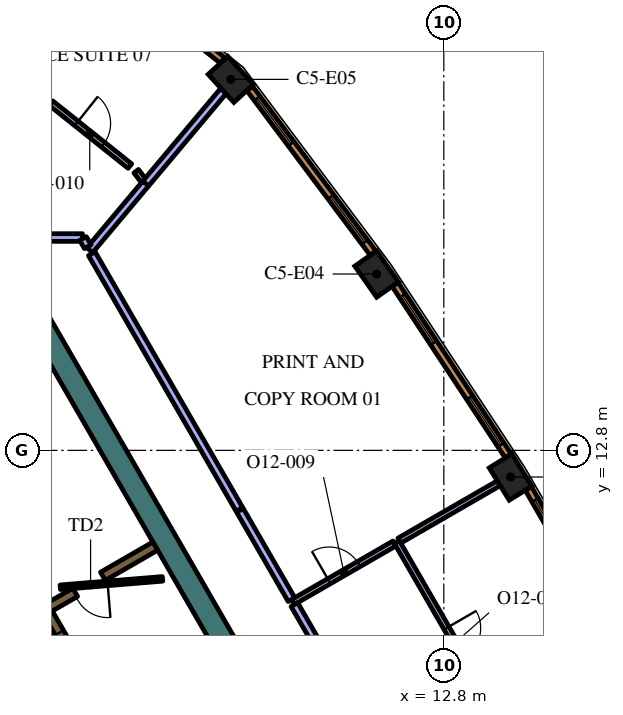
"""IFC4 building model, lengths in metres.
Left out: names, types, materials, properties, quantities, classifications, styles, units other than length and angle.
Written with IfcOpenShell. Run it as: python <this file> out.ifc"""

import sys

from ifc_helpers import new_model, si_unit, direction, frame, frame_2d, origin, origin_2d, place, context, subcontext, project, spatial, rectangle, extrude, element, fill, save


model = new_model("IFC4")
c1 = context("Model", 3, precision=1e-05, world=origin(), true_north=direction((0.0, 1.0)))
c2 = subcontext(c1, "Body", "Model", "MODEL_VIEW")
j1 = project(units=[si_unit("LENGTHUNIT", "METRE"), si_unit("PLANEANGLEUNIT", "RADIAN")], contexts=[c1])
p1 = place(None, origin())
s1 = spatial("IfcSite", under=j1, at=p1, CompositionType="ELEMENT")
p2 = place(p1, origin())
s2 = spatial("IfcBuilding", under=s1, at=p2, CompositionType="ELEMENT")
p3 = place(p2, frame((0.0, 0.0, 288.0)))
s3 = spatial("IfcBuildingStorey", under=s2, at=p3, CompositionType="ELEMENT", Elevation=288.0)
for number, where, z_axis, x_axis in (
    (1, (14.556, 12.098, 0.0), (0.0, 0.0, 1.0), (-0.526, 0.851, 0.0)),
    (2, (11.032, 17.44, 0.0), (0.0, 0.0, 1.0), (-0.575, 0.818, 0.0)),
    (3, (7.195, 22.561, 0.0), (0.0, 0.0, 1.0), (-0.676, 0.737, 0.0)),
):
    element("IfcColumn", number, at=place(p3, frame(where, z_axis=z_axis, x_axis=x_axis)), inside=s3, PredefinedType="COLUMN", context=c2, shape_type="SweptSolid", body=[
        extrude(rectangle(XDim=1.0, YDim=0.7, at=origin_2d()), origin(), (0.0, 0.0, 1.0), 4.2),
    ])
p4 = place(p3, frame((1.989, 16.456, 0.0), z_axis=(0.0, 0.0, 1.0), x_axis=(0.49999102663, -0.8660305845, 0.0)))
e4 = element("IfcWall", 4, at=p4, inside=s3, PredefinedType="SOLIDWALL", context=c2, shape_type="SweptSolid", body=[
    extrude(rectangle(XDim=12.406, YDim=0.6, at=frame_2d((6.203, 0.0))), origin(), (0.0, 0.0, 1.0), 4.2),
])
p5 = place(p3, frame((3.1, 9.064, 0.0), z_axis=(0.0, 0.0, 1.0), x_axis=(-0.866030133475, -0.499991807846, 0.0)))
e5 = element("IfcWall", 5, at=p5, inside=s3, PredefinedType="SOLIDWALL", context=c2, shape_type="SweptSolid", body=[
    extrude(rectangle(XDim=3.217, YDim=0.25, at=frame_2d((1.608, 0.0))), origin(), (0.0, 0.0, 1.0), 4.2),
])
p6 = place(p3, frame((3.83, 9.486, 0.0), z_axis=(0.0, 0.0, 1.0), x_axis=(0.865986202621, 0.500067892261, 0.0)))
e6 = element("IfcWall", 6, at=p6, inside=s3, PredefinedType="SOLIDWALL", context=c2, shape_type="SweptSolid", body=[
    extrude(rectangle(XDim=1.591, YDim=0.25, at=frame_2d((0.795, 0.0))), origin(), (0.0, 0.0, 1.0), 4.2),
])
p7 = place(p3, frame((8.565, -2.185, 0.0), z_axis=(0.0, 0.0, 1.0), x_axis=(-0.499997954832, 0.866026584559, 0.0)))
e7 = element("IfcWall", 7, at=p7, inside=s3, PredefinedType="SOLIDWALL", context=c2, shape_type="SweptSolid", body=[
    extrude(rectangle(XDim=12.35, YDim=0.25, at=frame_2d((6.175, 0.0))), origin(), (0.0, 0.0, 1.0), 4.2),
])
p8 = place(p7, frame((0.685, 0.0, 0.0)))
e8 = element("IfcOpeningElement", 8, at=p8, cuts=e7, PredefinedType="OPENING", context=c2, shape_type="SweptSolid", body=[
    extrude(rectangle(XDim=0.9, YDim=2.1, at=frame_2d((0.45, 1.05))), frame((0.0, 0.135, 0.0), z_axis=(0.0, -1.0, 0.0), x_axis=(1.0, 0.0, 0.0)), (0.0, 0.0, 1.0), 0.27),
])
p9 = place(p7, frame((3.105, 0.0, 0.0)))
e9 = element("IfcOpeningElement", 9, at=p9, cuts=e7, PredefinedType="OPENING", context=c2, shape_type="SweptSolid", body=[
    extrude(rectangle(XDim=1.1, YDim=2.1, at=frame_2d((0.55, 1.05))), frame((0.0, 0.135, 0.0), z_axis=(0.0, -1.0, 0.0), x_axis=(1.0, 0.0, 0.0)), (0.0, 0.0, 1.0), 0.27),
])
p10 = place(p7, frame((5.625, 0.0, 0.0)))
e10 = element("IfcOpeningElement", 10, at=p10, cuts=e7, PredefinedType="OPENING", context=c2, shape_type="SweptSolid", body=[
    extrude(rectangle(XDim=1.1, YDim=2.1, at=frame_2d((0.55, 1.05))), frame((0.0, 0.135, 0.0), z_axis=(0.0, -1.0, 0.0), x_axis=(1.0, 0.0, 0.0)), (0.0, 0.0, 1.0), 0.27),
])
p11 = place(p7, frame((8.145, 0.0, 0.0)))
e11 = element("IfcOpeningElement", 11, at=p11, cuts=e7, PredefinedType="OPENING", context=c2, shape_type="SweptSolid", body=[
    extrude(rectangle(XDim=1.1, YDim=2.1, at=frame_2d((0.55, 1.05))), frame((0.0, 0.135, 0.0), z_axis=(0.0, -1.0, 0.0), x_axis=(1.0, 0.0, 0.0)), (0.0, 0.0, 1.0), 0.27),
])
p12 = place(p7, frame((10.665, 0.0, 0.0)))
e12 = element("IfcOpeningElement", 12, at=p12, cuts=e7, PredefinedType="OPENING", context=c2, shape_type="SweptSolid", body=[
    extrude(rectangle(XDim=1.1, YDim=2.1, at=frame_2d((0.55, 1.05))), frame((0.0, 0.135, 0.0), z_axis=(0.0, -1.0, 0.0), x_axis=(1.0, 0.0, 0.0)), (0.0, 0.0, 1.0), 0.27),
])
p13 = place(p3, frame((5.398, 9.419, 0.0), z_axis=(0.0, 0.0, 1.0), x_axis=(-0.996653416376, -0.081743303248, 0.0)))
e13 = element("IfcWall", 13, at=p13, inside=s3, PredefinedType="PARTITIONING", context=c2, shape_type="SweptSolid", body=[
    extrude(rectangle(XDim=2.7, YDim=0.12, at=frame_2d((1.35, 0.0))), origin(), (0.0, 0.0, 1.0), 3.55),
])
p14 = place(p13, frame((1.45, 0.0, 0.0)))
e14 = element("IfcOpeningElement", 14, at=p14, cuts=e13, PredefinedType="OPENING", context=c2, shape_type="SweptSolid", body=[
    extrude(rectangle(XDim=0.9, YDim=2.1, at=frame_2d((0.45, 1.05))), frame((0.0, 0.07, 0.0), z_axis=(0.0, -1.0, 0.0), x_axis=(1.0, 0.0, 0.0)), (0.0, 0.0, 1.0), 0.14),
])
p15 = place(p3, frame((11.564, 10.387, 0.0), z_axis=(0.0, 0.0, 1.0), x_axis=(0.500002559113, -0.866023926275, 0.0)))
e15 = element("IfcWall", 15, at=p15, inside=s3, PredefinedType="PARTITIONING", context=c2, shape_type="SweptSolid", body=[
    extrude(rectangle(XDim=6.212, YDim=0.15, at=frame_2d((3.106, 0.0))), origin(), (0.0, 0.0, 1.0), 3.55),
])
p16 = place(p15, frame((2.612, 0.0, 0.0)))
e16 = element("IfcOpeningElement", 16, at=p16, cuts=e15, PredefinedType="OPENING", context=c2, shape_type="SweptSolid", body=[
    extrude(rectangle(XDim=0.9, YDim=2.1, at=frame_2d((0.45, 1.05))), frame((0.0, 0.085, 0.0), z_axis=(0.0, -1.0, 0.0), x_axis=(1.0, 0.0, 0.0)), (0.0, 0.0, 1.0), 0.17),
])
p17 = place(p3, frame((11.629, 10.424, 0.0), z_axis=(0.0, 0.0, 1.0), x_axis=(0.866061796884, 0.499936960004, 0.0)))
e17 = element("IfcWall", 17, at=p17, inside=s3, PredefinedType="PARTITIONING", context=c2, shape_type="SweptSolid", body=[
    extrude(rectangle(XDim=3.021, YDim=0.15, at=frame_2d((1.511, 0.0))), origin(), (0.0, 0.0, 1.0), 3.55),
])
p18 = place(p3, frame((8.829, 8.808, 0.0), z_axis=(0.0, 0.0, 1.0), x_axis=(0.866041857893, 0.499971499565, 0.0)))
e18 = element("IfcWall", 18, at=p18, inside=s3, PredefinedType="PARTITIONING", context=c2, shape_type="SweptSolid", body=[
    extrude(rectangle(XDim=3.083, YDim=0.15, at=frame_2d((1.542, 0.0))), origin(), (0.0, 0.0, 1.0), 3.55),
])
p19 = place(p18, frame((1.1, 0.0, 0.0)))
e19 = element("IfcOpeningElement", 19, at=p19, cuts=e18, PredefinedType="OPENING", context=c2, shape_type="SweptSolid", body=[
    extrude(rectangle(XDim=0.9, YDim=2.1, at=frame_2d((0.45, 1.05))), frame((0.0, 0.085, 0.0), z_axis=(0.0, -1.0, 0.0), x_axis=(1.0, 0.0, 0.0)), (0.0, 0.0, 1.0), 0.17),
])
p20 = place(p3, frame((13.436, 0.829, 0.0), z_axis=(0.0, 0.0, 1.0), x_axis=(-0.499983789798, 0.866034762547, 0.0)))
e20 = element("IfcWall", 20, at=p20, inside=s3, PredefinedType="PARTITIONING", context=c2, shape_type="SweptSolid", body=[
    extrude(rectangle(XDim=9.138, YDim=0.2, at=frame_2d((4.569, 0.0))), origin(), (0.0, 0.0, 1.0), 3.55),
])
p21 = place(p3, frame((4.95, 19.814, 0.0), z_axis=(0.0, 0.0, 1.0), x_axis=(0.642981953866, 0.765881326971, 0.0)))
e21 = element("IfcWall", 21, at=p21, inside=s3, PredefinedType="PARTITIONING", context=c2, shape_type="SweptSolid", body=[
    extrude(rectangle(XDim=3.188, YDim=0.2, at=frame_2d((1.594, 0.0))), origin(), (0.0, 0.0, 1.0), 3.55),
])
p22 = place(p3, frame((3.483, 18.067, 0.0), z_axis=(0.0, 0.0, 1.0), x_axis=(0.642896944312, 0.765952687177, 0.0)))
e22 = element("IfcWall", 22, at=p22, inside=s3, PredefinedType="PARTITIONING", context=c2, shape_type="SweptSolid", body=[
    extrude(rectangle(XDim=2.29, YDim=0.2, at=frame_2d((1.145, 0.0))), origin(), (0.0, 0.0, 1.0), 3.55),
])
p23 = place(p3, frame((8.792, 8.873, 0.0), z_axis=(0.0, 0.0, 1.0), x_axis=(-0.499992600721, 0.866029675718, 0.0)))
e23 = element("IfcWall", 23, at=p23, inside=s3, PredefinedType="PARTITIONING", context=c2, shape_type="SweptSolid", body=[
    extrude(rectangle(XDim=2.712, YDim=0.2, at=frame_2d((1.356, 0.0))), origin(), (0.0, 0.0, 1.0), 3.55),
])
p24 = place(p3, frame((7.421, 11.247, 0.0), z_axis=(0.0, 0.0, 1.0), x_axis=(-0.499999024953, 0.866025966727, 0.0)))
e24 = element("IfcWall", 24, at=p24, inside=s3, PredefinedType="PARTITIONING", context=c2, shape_type="SweptSolid", body=[
    extrude(rectangle(XDim=7.769, YDim=0.2, at=frame_2d((3.884, 0.0))), origin(), (0.0, 0.0, 1.0), 3.55),
])
p25 = place(p3, frame((4.891, 19.899, 0.0), z_axis=(0.0, 0.0, 1.0), x_axis=(-0.6, 0.8, 0.0)))
e25 = element("IfcWall", 25, at=p25, inside=s3, PredefinedType="PARTITIONING", context=c2, shape_type="SweptSolid", body=[
    extrude(rectangle(XDim=0.309, YDim=0.15, at=frame_2d((0.154, 0.0))), origin(), (0.0, 0.0, 1.0), 3.55),
])
p26 = place(p3, frame((2.462, 21.937, 0.0), z_axis=(0.0, 0.0, 1.0), x_axis=(0.781630346222, -0.62374193531, 0.0)))
e26 = element("IfcWall", 26, at=p26, inside=s3, PredefinedType="PARTITIONING", context=c2, shape_type="SweptSolid", body=[
    extrude(rectangle(XDim=2.656, YDim=0.15, at=frame_2d((1.328, 0.0))), origin(), (0.0, 0.0, 1.0), 3.55),
])
p27 = place(p26, frame((0.857, 0.0, 0.0)))
e27 = element("IfcOpeningElement", 27, at=p27, cuts=e26, PredefinedType="OPENING", context=c2, shape_type="SweptSolid", body=[
    extrude(rectangle(XDim=0.9, YDim=2.1, at=frame_2d((0.45, 1.05))), frame((0.0, 0.085, 0.0), z_axis=(0.0, -1.0, 0.0), x_axis=(1.0, 0.0, 0.0)), (0.0, 0.0, 1.0), 0.17),
])
p28 = place(p3, frame((3.291, 18.4, 0.0), z_axis=(0.0, 0.0, 1.0), x_axis=(-1.0, 0.0, 0.0)))
e28 = element("IfcWall", 28, at=p28, inside=s3, PredefinedType="PARTITIONING", context=c2, shape_type="SweptSolid", body=[
    extrude(rectangle(XDim=6.582, YDim=0.2, at=frame_2d((3.291, 0.0))), origin(), (0.0, 0.0, 1.0), 3.55),
])
p29 = place(p3, frame((3.43, 18.159, 0.0), z_axis=(0.0, 0.0, 1.0), x_axis=(-0.499949632511, 0.866054481515, 0.0)))
e29 = element("IfcWall", 29, at=p29, inside=s3, PredefinedType="PARTITIONING", context=c2, shape_type="SweptSolid", body=[
    extrude(rectangle(XDim=0.248, YDim=0.2, at=frame_2d((0.124, 0.0))), origin(), (0.0, 0.0, 1.0), 3.55),
])
p30 = place(p3, frame((17.728, 7.114, 0.0), z_axis=(0.0, 0.0, 1.0), x_axis=(-0.500024767483, 0.866011103799, 0.0)))
e30 = element("IfcWall", 30, at=p30, inside=s3, PredefinedType="SOLIDWALL", context=c2, shape_type="SweptSolid", body=[
    extrude(rectangle(XDim=5.406, YDim=0.19, at=frame_2d((2.703, 0.0))), origin(), (0.0, 0.0, 1.0), 3.95),
])
p31 = place(p30, frame((0.346, 0.0, 0.6)))
e31 = element("IfcOpeningElement", 31, at=p31, cuts=e30, PredefinedType="OPENING", context=c2, shape_type="SweptSolid", body=[
    extrude(rectangle(XDim=1.5, YDim=2.85, at=frame_2d((0.75, 1.425))), frame((0.0, 0.105, 0.0), z_axis=(0.0, -1.0, 0.0), x_axis=(1.0, 0.0, 0.0)), (0.0, 0.0, 1.0), 0.21),
])
p32 = place(p30, frame((3.56, 0.0, 0.6)))
e32 = element("IfcOpeningElement", 32, at=p32, cuts=e30, PredefinedType="OPENING", context=c2, shape_type="SweptSolid", body=[
    extrude(rectangle(XDim=1.5, YDim=2.85, at=frame_2d((0.75, 1.425))), frame((0.0, 0.105, 0.0), z_axis=(0.0, -1.0, 0.0), x_axis=(1.0, 0.0, 0.0)), (0.0, 0.0, 1.0), 0.21),
])
p33 = place(p3, frame((14.496, 12.653, 0.0), z_axis=(0.0, 0.0, 1.0), x_axis=(-0.550744054781, 0.83467417962, 0.0)))
e33 = element("IfcWall", 33, at=p33, inside=s3, PredefinedType="SOLIDWALL", context=c2, shape_type="SweptSolid", body=[
    extrude(rectangle(XDim=5.406, YDim=0.19, at=frame_2d((2.703, 0.0))), origin(), (0.0, 0.0, 1.0), 3.95),
])
p34 = place(p33, frame((0.346, 0.0, 0.6)))
e34 = element("IfcOpeningElement", 34, at=p34, cuts=e33, PredefinedType="OPENING", context=c2, shape_type="SweptSolid", body=[
    extrude(rectangle(XDim=1.5, YDim=2.85, at=frame_2d((0.75, 1.425))), frame((0.0, 0.105, 0.0), z_axis=(0.0, -1.0, 0.0), x_axis=(1.0, 0.0, 0.0)), (0.0, 0.0, 1.0), 0.21),
])
p35 = place(p33, frame((3.559, 0.0, 0.6)))
e35 = element("IfcOpeningElement", 35, at=p35, cuts=e33, PredefinedType="OPENING", context=c2, shape_type="SweptSolid", body=[
    extrude(rectangle(XDim=1.5, YDim=2.85, at=frame_2d((0.75, 1.425))), frame((0.0, 0.105, 0.0), z_axis=(0.0, -1.0, 0.0), x_axis=(1.0, 0.0, 0.0)), (0.0, 0.0, 1.0), 0.21),
])
p36 = place(p3, frame((10.938, 17.99, 0.0), z_axis=(0.0, 0.0, 1.0), x_axis=(-0.599559865294, 0.800329911929, 0.0)))
e36 = element("IfcWall", 36, at=p36, inside=s3, PredefinedType="SOLIDWALL", context=c2, shape_type="SweptSolid", body=[
    extrude(rectangle(XDim=5.415, YDim=0.19, at=frame_2d((2.708, 0.0))), origin(), (0.0, 0.0, 1.0), 3.95),
])
p37 = place(p36, frame((0.358, 0.0, 0.6)))
e37 = element("IfcOpeningElement", 37, at=p37, cuts=e36, PredefinedType="OPENING", context=c2, shape_type="SweptSolid", body=[
    extrude(rectangle(XDim=1.5, YDim=2.85, at=frame_2d((0.75, 1.425))), frame((0.0, 0.105, 0.0), z_axis=(0.0, -1.0, 0.0), x_axis=(1.0, 0.0, 0.0)), (0.0, 0.0, 1.0), 0.21),
])
p38 = place(p36, frame((3.593, 0.0, 0.6)))
e38 = element("IfcOpeningElement", 38, at=p38, cuts=e36, PredefinedType="OPENING", context=c2, shape_type="SweptSolid", body=[
    extrude(rectangle(XDim=1.5, YDim=2.85, at=frame_2d((0.75, 1.425))), frame((0.0, 0.105, 0.0), z_axis=(0.0, -1.0, 0.0), x_axis=(1.0, 0.0, 0.0)), (0.0, 0.0, 1.0), 0.21),
])
p39 = place(p3, frame((6.977, 23.061, 0.0), z_axis=(0.0, 0.0, 1.0), x_axis=(-0.781626234064, 0.623747088349, 0.0)))
e39 = element("IfcWall", 39, at=p39, inside=s3, PredefinedType="SOLIDWALL", context=c2, shape_type="SweptSolid", body=[
    extrude(rectangle(XDim=3.237, YDim=0.19, at=frame_2d((1.618, 0.0))), origin(), (0.0, 0.0, 1.0), 3.95),
])
p40 = place(p39, frame((1.068, 0.0, 0.6)))
e40 = element("IfcOpeningElement", 40, at=p40, cuts=e39, PredefinedType="OPENING", context=c2, shape_type="SweptSolid", body=[
    extrude(rectangle(XDim=1.1, YDim=2.85, at=frame_2d((0.55, 1.425))), frame((0.0, 0.105, 0.0), z_axis=(0.0, -1.0, 0.0), x_axis=(1.0, 0.0, 0.0)), (0.0, 0.0, 1.0), 0.21),
])
p41 = place(p12, origin())
e41 = element("IfcDoor", 41, at=p41, inside=s3, OperationType="DOUBLE_DOOR_SLIDING", PredefinedType="DOOR", context=c2, shape_type="SweptSolid", body=[
    extrude(rectangle(XDim=1.1, YDim=2.1, at=frame_2d((0.55, 1.05))), frame((0.0, 0.025, 0.0), z_axis=(0.0, -1.0, 0.0), x_axis=(1.0, 0.0, 0.0)), (0.0, 0.0, 1.0), 0.05),
])
fill(e12, e41)
p42 = place(p14, origin())
e42 = element("IfcDoor", 42, at=p42, inside=s3, OperationType="SINGLE_SWING_LEFT", PredefinedType="DOOR", context=c2, shape_type="SweptSolid", body=[
    extrude(rectangle(XDim=0.9, YDim=2.1, at=frame_2d((0.45, 1.05))), frame((0.0, 0.025, 0.0), z_axis=(0.0, -1.0, 0.0), x_axis=(1.0, 0.0, 0.0)), (0.0, 0.0, 1.0), 0.05),
])
fill(e14, e42)
p43 = place(p16, origin())
e43 = element("IfcDoor", 43, at=p43, inside=s3, OperationType="SINGLE_SWING_LEFT", PredefinedType="DOOR", context=c2, shape_type="SweptSolid", body=[
    extrude(rectangle(XDim=0.9, YDim=2.1, at=frame_2d((0.45, 1.05))), frame((0.0, 0.025, 0.0), z_axis=(0.0, -1.0, 0.0), x_axis=(1.0, 0.0, 0.0)), (0.0, 0.0, 1.0), 0.05),
])
fill(e16, e43)
p44 = place(p19, origin())
e44 = element("IfcDoor", 44, at=p44, inside=s3, OperationType="SINGLE_SWING_RIGHT", PredefinedType="DOOR", context=c2, shape_type="SweptSolid", body=[
    extrude(rectangle(XDim=0.9, YDim=2.1, at=frame_2d((0.45, 1.05))), frame((0.0, 0.025, 0.0), z_axis=(0.0, -1.0, 0.0), x_axis=(1.0, 0.0, 0.0)), (0.0, 0.0, 1.0), 0.05),
])
fill(e19, e44)
p45 = place(p27, origin())
e45 = element("IfcDoor", 45, at=p45, inside=s3, OperationType="SINGLE_SWING_LEFT", PredefinedType="DOOR", context=c2, shape_type="SweptSolid", body=[
    extrude(rectangle(XDim=0.9, YDim=2.1, at=frame_2d((0.45, 1.05))), frame((0.0, 0.025, 0.0), z_axis=(0.0, -1.0, 0.0), x_axis=(1.0, 0.0, 0.0)), (0.0, 0.0, 1.0), 0.05),
])
fill(e27, e45)
p46 = place(p32, origin())
e46 = element("IfcWindow", 46, at=p46, inside=s3, PartitioningType="SINGLE_PANEL", PredefinedType="WINDOW", context=c2, shape_type="SweptSolid", body=[
    extrude(rectangle(XDim=1.5, YDim=2.85, at=frame_2d((0.75, 1.425))), frame((0.0, 0.045, 0.0), z_axis=(0.0, -1.0, 0.0), x_axis=(1.0, 0.0, 0.0)), (0.0, 0.0, 1.0), 0.06),
])
fill(e32, e46)
p47 = place(p34, origin())
e47 = element("IfcWindow", 47, at=p47, inside=s3, PartitioningType="SINGLE_PANEL", PredefinedType="WINDOW", context=c2, shape_type="SweptSolid", body=[
    extrude(rectangle(XDim=1.5, YDim=2.85, at=frame_2d((0.75, 1.425))), frame((0.0, 0.045, 0.0), z_axis=(0.0, -1.0, 0.0), x_axis=(1.0, 0.0, 0.0)), (0.0, 0.0, 1.0), 0.06),
])
fill(e34, e47)
p48 = place(p35, origin())
e48 = element("IfcWindow", 48, at=p48, inside=s3, PartitioningType="SINGLE_PANEL", PredefinedType="WINDOW", context=c2, shape_type="SweptSolid", body=[
    extrude(rectangle(XDim=1.5, YDim=2.85, at=frame_2d((0.75, 1.425))), frame((0.0, 0.045, 0.0), z_axis=(0.0, -1.0, 0.0), x_axis=(1.0, 0.0, 0.0)), (0.0, 0.0, 1.0), 0.06),
])
fill(e35, e48)
p49 = place(p37, origin())
e49 = element("IfcWindow", 49, at=p49, inside=s3, PartitioningType="SINGLE_PANEL", PredefinedType="WINDOW", context=c2, shape_type="SweptSolid", body=[
    extrude(rectangle(XDim=1.5, YDim=2.85, at=frame_2d((0.75, 1.425))), frame((0.0, 0.045, 0.0), z_axis=(0.0, -1.0, 0.0), x_axis=(1.0, 0.0, 0.0)), (0.0, 0.0, 1.0), 0.06),
])
fill(e37, e49)
p50 = place(p38, origin())
e50 = element("IfcWindow", 50, at=p50, inside=s3, PartitioningType="SINGLE_PANEL", PredefinedType="WINDOW", context=c2, shape_type="SweptSolid", body=[
    extrude(rectangle(XDim=1.5, YDim=2.85, at=frame_2d((0.75, 1.425))), frame((0.0, 0.045, 0.0), z_axis=(0.0, -1.0, 0.0), x_axis=(1.0, 0.0, 0.0)), (0.0, 0.0, 1.0), 0.06),
])
fill(e38, e50)
save(model, sys.argv[1])
